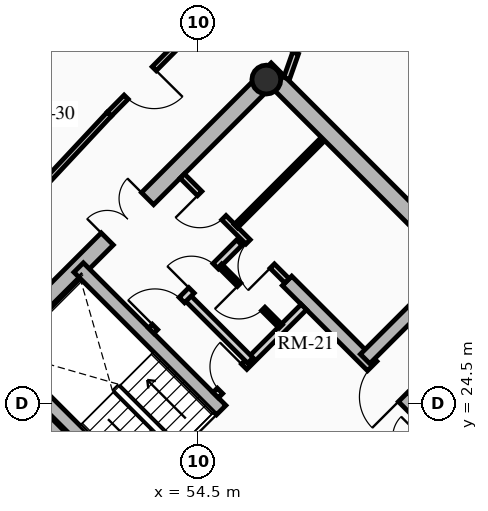
"""IFC4 building model, lengths in metres.
Left out: names, types, materials, properties, quantities, classifications, styles, units other than length and angle.
Written with IfcOpenShell. Run it as: python <this file> out.ifc"""

import sys

from ifc_helpers import new_model, si_unit, direction, frame, frame_2d, origin, origin_2d, place, context, subcontext, project, spatial, rectangle, hollow_circle, extrude, source, transform, mapped, element, fill, save


model = new_model("IFC4")
c1 = context("Model", 3, precision=1e-05, world=origin(), true_north=direction((0.0, 1.0)))
c2 = subcontext(c1, "Body", "Model", "MODEL_VIEW")
j1 = project(units=[si_unit("LENGTHUNIT", "METRE"), si_unit("PLANEANGLEUNIT", "RADIAN")], contexts=[c1])
p1 = place(None, origin())
s1 = spatial("IfcSite", under=j1, at=p1, CompositionType="ELEMENT")
p2 = place(p1, origin())
s2 = spatial("IfcBuilding", under=s1, at=p2, CompositionType="ELEMENT")
p3 = place(p2, frame((0.0, 0.0, 144.04)))
s3 = spatial("IfcBuildingStorey", under=s2, at=p3, CompositionType="ELEMENT", Elevation=144.04)
for number, where, z_axis, x_axis in (
    (1, (58.737, 15.697, 0.0), (0.0, 0.0, 1.0), (-0.707, 0.707, 0.0)),
    (2, (66.303, 23.263, 0.0), (0.0, 0.0, 1.0), (-0.707, 0.707, 0.0)),
):
    element("IfcWall", number, at=place(p3, frame(where, z_axis=z_axis, x_axis=x_axis)), inside=s3, PredefinedType="SHEAR", context=c2, shape_type="SweptSolid", body=[
        extrude(rectangle(XDim=14.2, YDim=0.45, at=frame_2d((7.1, 0.0))), origin(), (0.0, 0.0, 1.0), 3.06),
    ])
p4 = place(p3, frame((48.856, 25.578, 0.0), z_axis=(0.0, 0.0, 1.0), x_axis=(0.707106781187, 0.707106781187, 0.0)))
e3 = element("IfcWall", 3, at=p4, inside=s3, PredefinedType="SHEAR", context=c2, shape_type="SweptSolid", body=[
    extrude(rectangle(XDim=10.7, YDim=0.45, at=frame_2d((5.35, 0.0))), origin(), (0.0, 0.0, 1.0), 3.06),
])
m1 = source(origin(), c2, "Body", "SweptSolid", [
    extrude(rectangle(XDim=1.5, YDim=2.02, at=frame_2d((0.75, 1.01))), frame((0.0, 0.235, 0.0), z_axis=(0.0, -1.0, 0.0), x_axis=(1.0, 0.0, 0.0)), (0.0, 0.0, 1.0), 0.47),
])
p5 = place(p4, frame((4.6, 0.0, 0.0)))
e4 = element("IfcOpeningElement", 4, at=p5, cuts=e3, PredefinedType="OPENING", context=c2, shape_type="MappedRepresentation", body=[
    mapped(m1, transform((0.0, 0.0, 0.0), x_axis=(1.0, 0.0, 0.0), y_axis=(0.0, 1.0, 0.0), z_axis=(0.0, 0.0, 1.0), scale=1.0)),
])
p6 = place(p3, frame((61.078, 18.355, 0.0), z_axis=(0.0, 0.0, 1.0), x_axis=(-0.707106781187, 0.707106781187, 0.0)))
e5 = element("IfcWall", 5, at=p6, inside=s3, PredefinedType="SHEAR", context=c2, shape_type="SweptSolid", body=[
    extrude(rectangle(XDim=13.75, YDim=0.35, at=frame_2d((6.875, 0.0))), origin(), (0.0, 0.0, 1.0), 3.06),
])
m2 = source(origin(), c2, "Body", "SweptSolid", [
    extrude(rectangle(XDim=1.1, YDim=2.015, at=frame_2d((0.55, 1.007))), frame((0.0, 0.185, 0.0), z_axis=(0.0, -1.0, 0.0), x_axis=(1.0, 0.0, 0.0)), (0.0, 0.0, 1.0), 0.37),
])
p7 = place(p6, frame((4.875, 0.0, 0.0)))
e6 = element("IfcOpeningElement", 6, at=p7, cuts=e5, PredefinedType="OPENING", context=c2, shape_type="MappedRepresentation", body=[
    mapped(m2, transform((0.0, 0.0, 0.0), x_axis=(1.0, 0.0, 0.0), y_axis=(0.0, 1.0, 0.0), z_axis=(0.0, 0.0, 1.0), scale=1.0)),
])
p8 = place(p6, frame((0.65, 0.0, 0.0)))
e7 = element("IfcOpeningElement", 7, at=p8, cuts=e5, PredefinedType="OPENING", context=c2, shape_type="MappedRepresentation", body=[
    mapped(m2, transform((0.0, 0.0, 0.0), x_axis=(1.0, 0.0, 0.0), y_axis=(0.0, 1.0, 0.0), z_axis=(0.0, 0.0, 1.0), scale=1.0)),
])
p9 = place(p6, frame((2.65, 0.0, 0.0)))
e8 = element("IfcOpeningElement", 8, at=p9, cuts=e5, PredefinedType="OPENING", context=c2, shape_type="MappedRepresentation", body=[
    mapped(m2, transform((0.0, 0.0, 0.0), x_axis=(1.0, 0.0, 0.0), y_axis=(0.0, 1.0, 0.0), z_axis=(0.0, 0.0, 1.0), scale=1.0)),
])
m3 = source(origin(), c2, "Body", "SweptSolid", [
    extrude(rectangle(XDim=1.15, YDim=2.02, at=frame_2d((0.575, 1.01))), frame((0.0, 0.185, 0.0), z_axis=(0.0, -1.0, 0.0), x_axis=(1.0, 0.0, 0.0)), (0.0, 0.0, 1.0), 0.37),
])
p10 = place(p6, frame((7.295, 0.0, 0.0)))
e9 = element("IfcOpeningElement", 9, at=p10, cuts=e5, PredefinedType="OPENING", context=c2, shape_type="MappedRepresentation", body=[
    mapped(m3, transform((0.0, 0.0, 0.0), x_axis=(1.0, 0.0, 0.0), y_axis=(0.0, 1.0, 0.0), z_axis=(0.0, 0.0, 1.0), scale=1.0)),
])
p11 = place(p3, frame((63.645, 20.922, 0.0), z_axis=(0.0, 0.0, 1.0), x_axis=(-0.70711946392, 0.707094098226, 0.0)))
e10 = element("IfcWall", 10, at=p11, inside=s3, PredefinedType="SHEAR", context=c2, shape_type="SweptSolid", body=[
    extrude(rectangle(XDim=9.625, YDim=0.35, at=frame_2d((4.812, 0.0))), origin(), (0.0, 0.0, 1.0), 3.06),
])
p12 = place(p11, frame((5.305, 0.0, 0.0)))
e11 = element("IfcOpeningElement", 11, at=p12, cuts=e10, PredefinedType="OPENING", context=c2, shape_type="MappedRepresentation", body=[
    mapped(m3, transform((0.0, 0.0, 0.0), x_axis=(1.0, 0.0, 0.0), y_axis=(0.0, 1.0, 0.0), z_axis=(0.0, 0.0, 1.0), scale=1.0)),
])
p13 = place(p3, frame((53.922, 21.141, 0.0), z_axis=(0.0, 0.0, 1.0), x_axis=(-0.707088616009, 0.707124945897, 0.0)))
e12 = element("IfcWall", 12, at=p13, inside=s3, PredefinedType="SHEAR", context=c2, shape_type="SweptSolid", body=[
    extrude(rectangle(XDim=6.72, YDim=0.35, at=frame_2d((3.36, 0.0))), origin(), (0.0, 0.0, 1.0), 3.06),
])
p14 = place(p3, frame((58.893, 25.674, 0.0), z_axis=(0.0, 0.0, 1.0), x_axis=(0.707106781187, 0.707106781187, 0.0)))
e13 = element("IfcWall", 13, at=p14, inside=s3, PredefinedType="SHEAR", context=c2, shape_type="SweptSolid", body=[
    extrude(rectangle(XDim=3.285, YDim=0.35, at=frame_2d((1.643, 0.0))), origin(), (0.0, 0.0, 1.0), 3.06),
])
p15 = place(p3, frame((56.294, 33.024, 0.0), z_axis=(0.0, 0.0, 1.0), x_axis=(0.707106781187, 0.707106781187, 0.0)))
e14 = element("IfcColumn", 14, at=p15, inside=s3, PredefinedType="COLUMN", context=c2, shape_type="SweptSolid", body=[
    extrude(hollow_circle(Radius=0.38, WallThickness=0.032, at=origin_2d()), origin(), (0.0, 0.0, 1.0), 3.06),
])
p16 = place(p3, frame((58.214, 21.467, 0.0), z_axis=(0.0, 0.0, 1.0), x_axis=(0.707106781187, 0.707106781187, 0.0)))
e15 = element("IfcWall", 15, at=p16, inside=s3, PredefinedType="PARTITIONING", context=c2, shape_type="SweptSolid", body=[
    extrude(rectangle(XDim=3.28, YDim=0.2, at=frame_2d((1.64, 0.0))), origin(), (0.0, 0.0, 1.0), 2.705),
])
m4 = source(origin(), c2, "Body", "SweptSolid", [
    extrude(rectangle(XDim=1.5, YDim=2.02, at=frame_2d((0.75, 1.01))), frame((0.0, 0.11, 0.0), z_axis=(0.0, -1.0, 0.0), x_axis=(1.0, 0.0, 0.0)), (0.0, 0.0, 1.0), 0.22),
])
p17 = place(p16, frame((1.55, 0.0, 0.0)))
e16 = element("IfcOpeningElement", 16, at=p17, cuts=e15, PredefinedType="OPENING", context=c2, shape_type="MappedRepresentation", body=[
    mapped(m4, transform((0.0, 0.0, 0.0), x_axis=(1.0, 0.0, 0.0), y_axis=(0.0, 1.0, 0.0), z_axis=(0.0, 0.0, 1.0), scale=1.0)),
])
p18 = place(p3, frame((54.961, 24.719, 0.0), z_axis=(0.0, 0.0, 1.0), x_axis=(0.707106781187, 0.707106781187, 0.0)))
e17 = element("IfcWall", 17, at=p18, inside=s3, PredefinedType="PARTITIONING", context=c2, shape_type="SweptSolid", body=[
    extrude(rectangle(XDim=3.28, YDim=0.2, at=frame_2d((1.64, 0.0))), origin(), (0.0, 0.0, 1.0), 2.705),
])
m5 = source(origin(), c2, "Body", "SweptSolid", [
    extrude(rectangle(XDim=0.9, YDim=2.005, at=frame_2d((0.45, 1.002))), frame((0.0, 0.11, 0.0), z_axis=(0.0, -1.0, 0.0), x_axis=(1.0, 0.0, 0.0)), (0.0, 0.0, 1.0), 0.22),
])
p19 = place(p18, frame((0.16, 0.0, 0.0)))
e18 = element("IfcOpeningElement", 18, at=p19, cuts=e17, PredefinedType="OPENING", context=c2, shape_type="MappedRepresentation", body=[
    mapped(m5, transform((0.0, 0.0, 0.0), x_axis=(1.0, 0.0, 0.0), y_axis=(0.0, 1.0, 0.0), z_axis=(0.0, 0.0, 1.0), scale=1.0)),
])
p20 = place(p3, frame((55.874, 25.631, 0.0), z_axis=(0.0, 0.0, 1.0), x_axis=(-0.707157639372, 0.707055919343, 0.0)))
e19 = element("IfcWall", 19, at=p20, inside=s3, PredefinedType="PARTITIONING", context=c2, shape_type="SweptSolid", body=[
    extrude(rectangle(XDim=2.4, YDim=0.2, at=frame_2d((1.2, 0.0))), origin(), (0.0, 0.0, 1.0), 2.705),
])
p21 = place(p3, frame((53.264, 26.416, 0.0), z_axis=(0.0, 0.0, 1.0), x_axis=(0.707106781187, 0.707106781187, 0.0)))
e20 = element("IfcWall", 20, at=p21, inside=s3, PredefinedType="PARTITIONING", context=c2, shape_type="SweptSolid", body=[
    extrude(rectangle(XDim=3.28, YDim=0.2, at=frame_2d((1.64, 0.0))), origin(), (0.0, 0.0, 1.0), 2.705),
])
m6 = source(origin(), c2, "Body", "SweptSolid", [
    extrude(rectangle(XDim=1.0, YDim=2.015, at=frame_2d((0.5, 1.007))), frame((0.0, 0.11, 0.0), z_axis=(0.0, -1.0, 0.0), x_axis=(1.0, 0.0, 0.0)), (0.0, 0.0, 1.0), 0.22),
])
p22 = place(p21, frame((0.14, 0.0, 0.0)))
e21 = element("IfcOpeningElement", 21, at=p22, cuts=e20, PredefinedType="OPENING", context=c2, shape_type="MappedRepresentation", body=[
    mapped(m6, transform((0.0, 0.0, 0.0), x_axis=(1.0, 0.0, 0.0), y_axis=(0.0, 1.0, 0.0), z_axis=(0.0, 0.0, 1.0), scale=1.0)),
])
p23 = place(p21, frame((1.5, 0.0, 0.0)))
e22 = element("IfcOpeningElement", 22, at=p23, cuts=e20, PredefinedType="OPENING", context=c2, shape_type="MappedRepresentation", body=[
    mapped(m5, transform((0.0, 0.0, 0.0), x_axis=(1.0, 0.0, 0.0), y_axis=(0.0, 1.0, 0.0), z_axis=(0.0, 0.0, 1.0), scale=1.0)),
])
p24 = place(p3, frame((56.673, 26.529, 0.0), z_axis=(0.0, 0.0, 1.0), x_axis=(-0.707052764397, 0.70716079385, 0.0)))
e23 = element("IfcWall", 23, at=p24, inside=s3, PredefinedType="PARTITIONING", context=c2, shape_type="SweptSolid", body=[
    extrude(rectangle(XDim=2.26, YDim=0.125, at=frame_2d((1.13, 0.0))), origin(), (0.0, 0.0, 1.0), 2.705),
])
m7 = source(origin(), c2, "Body", "SweptSolid", [
    extrude(rectangle(XDim=0.9, YDim=2.005, at=frame_2d((0.45, 1.002))), frame((0.0, 0.073, 0.0), z_axis=(0.0, -1.0, 0.0), x_axis=(1.0, 0.0, 0.0)), (0.0, 0.0, 1.0), 0.145),
])
p25 = place(p24, frame((0.65, 0.0, 0.0)))
e24 = element("IfcOpeningElement", 24, at=p25, cuts=e23, PredefinedType="OPENING", context=c2, shape_type="MappedRepresentation", body=[
    mapped(m7, transform((0.0, 0.0, 0.0), x_axis=(1.0, 0.0, 0.0), y_axis=(0.0, 1.0, 0.0), z_axis=(0.0, 0.0, 1.0), scale=1.0)),
])
p26 = place(p3, frame((56.839, 27.728, 0.0), z_axis=(0.0, 0.0, 1.0), x_axis=(-0.707106781187, 0.707106781187, 0.0)))
e25 = element("IfcWall", 25, at=p26, inside=s3, PredefinedType="PARTITIONING", context=c2, shape_type="SweptSolid", body=[
    extrude(rectangle(XDim=3.9, YDim=0.16, at=frame_2d((1.95, 0.0))), origin(), (0.0, 0.0, 1.0), 2.705),
])
m8 = source(origin(), c2, "Body", "SweptSolid", [
    extrude(rectangle(XDim=0.9, YDim=2.005, at=frame_2d((0.45, 1.002))), frame((0.0, 0.09, 0.0), z_axis=(0.0, -1.0, 0.0), x_axis=(1.0, 0.0, 0.0)), (0.0, 0.0, 1.0), 0.18),
])
p27 = place(p26, frame((0.55, 0.0, 0.0)))
e26 = element("IfcOpeningElement", 26, at=p27, cuts=e25, PredefinedType="OPENING", context=c2, shape_type="MappedRepresentation", body=[
    mapped(m8, transform((0.0, 0.0, 0.0), x_axis=(1.0, 0.0, 0.0), y_axis=(0.0, 1.0, 0.0), z_axis=(0.0, 0.0, 1.0), scale=1.0)),
])
p28 = place(p26, frame((2.35, 0.0, 0.0)))
e27 = element("IfcOpeningElement", 27, at=p28, cuts=e25, PredefinedType="OPENING", context=c2, shape_type="MappedRepresentation", body=[
    mapped(m8, transform((0.0, 0.0, 0.0), x_axis=(1.0, 0.0, 0.0), y_axis=(0.0, 1.0, 0.0), z_axis=(0.0, 0.0, 1.0), scale=1.0)),
])
p29 = place(p3, frame((55.492, 29.167, 0.0), z_axis=(0.0, 0.0, 1.0), x_axis=(0.707144688645, 0.707068871696, 0.0)))
e28 = element("IfcWall", 28, at=p29, inside=s3, PredefinedType="PARTITIONING", context=c2, shape_type="SweptSolid", body=[
    extrude(rectangle(XDim=3.22, YDim=0.125, at=frame_2d((1.61, 0.0))), origin(), (0.0, 0.0, 1.0), 2.242),
])
p30 = place(p3, frame((54.501, 34.479, 0.0), z_axis=(0.0, 0.0, 1.0), x_axis=(-0.70346073929, -0.710734119258, 0.0)))
e29 = element("IfcWall", 29, at=p30, inside=s3, PredefinedType="PARTITIONING", context=c2, shape_type="SweptSolid", body=[
    extrude(rectangle(XDim=3.323, YDim=0.15, at=frame_2d((1.662, 0.0))), origin(), (0.0, 0.0, 1.0), 2.275),
])
m9 = source(origin(), c2, "Body", "SweptSolid", [
    extrude(rectangle(XDim=1.05, YDim=2.015, at=frame_2d((0.525, 1.007))), frame((0.0, 0.085, 0.0), z_axis=(0.0, -1.0, 0.0), x_axis=(1.0, 0.0, 0.0)), (0.0, 0.0, 1.0), 0.17),
])
p31 = place(p30, frame((1.645, 0.0, 0.0)))
e30 = element("IfcOpeningElement", 30, at=p31, cuts=e29, PredefinedType="OPENING", context=c2, shape_type="MappedRepresentation", body=[
    mapped(m9, transform((0.0, 0.0, 0.0), x_axis=(1.0, 0.0, 0.0), y_axis=(0.0, 1.0, 0.0), z_axis=(0.0, 0.0, 1.0), scale=1.0)),
])
p32 = place(p3, frame((52.163, 32.117, 0.0), z_axis=(0.0, 0.0, 1.0), x_axis=(-0.682485296115, -0.730899323154, 0.0)))
e31 = element("IfcWall", 31, at=p32, inside=s3, PredefinedType="PARTITIONING", context=c2, shape_type="SweptSolid", body=[
    extrude(rectangle(XDim=6.404, YDim=0.15, at=frame_2d((3.202, 0.0))), origin(), (0.0, 0.0, 1.0), 2.275),
])
p33 = place(p3, frame((56.828, 33.056, 0.0), z_axis=(0.0, 0.0, 1.0), x_axis=(0.334295395752, 0.942468348741, 0.0)))
e32 = element("IfcWall", 32, at=p33, inside=s3, PredefinedType="PARTITIONING", context=c2, shape_type="SweptSolid", body=[
    extrude(rectangle(XDim=1.956, YDim=0.16, at=frame_2d((0.978, 0.0))), origin(), (0.0, 0.0, 1.0), 2.275),
])
m10 = source(origin(), c2, "Body", "SweptSolid", [
    extrude(rectangle(XDim=1.05, YDim=2.015, at=frame_2d((0.525, 1.007))), frame((0.0, 0.09, 0.0), z_axis=(0.0, -1.0, 0.0), x_axis=(1.0, 0.0, 0.0)), (0.0, 0.0, 1.0), 0.18),
])
p34 = place(p33, frame((0.706, 0.0, 0.0)))
e33 = element("IfcOpeningElement", 33, at=p34, cuts=e32, PredefinedType="OPENING", context=c2, shape_type="MappedRepresentation", body=[
    mapped(m10, transform((0.0, 0.0, 0.0), x_axis=(1.0, 0.0, 0.0), y_axis=(0.0, 1.0, 0.0), z_axis=(0.0, 0.0, 1.0), scale=1.0)),
])
p35 = place(p3, frame((52.885, 35.914, 0.0), z_axis=(0.0, 0.0, 1.0), x_axis=(-0.750358205808, -0.66103143872, 0.0)))
e34 = element("IfcWall", 34, at=p35, inside=s3, PredefinedType="PARTITIONING", context=c2, shape_type="SweptSolid", body=[
    extrude(rectangle(XDim=3.654, YDim=0.125, at=frame_2d((1.827, 0.0))), origin(), (0.0, 0.0, 1.0), 2.275),
])
m11 = source(origin(), c2, "Body", "SweptSolid", [
    extrude(rectangle(XDim=1.15, YDim=2.02, at=frame_2d((0.575, 1.01))), frame((0.0, 0.025, 0.0), z_axis=(0.0, -1.0, 0.0), x_axis=(1.0, 0.0, 0.0)), (0.0, 0.0, 1.0), 0.05),
])
p36 = place(p10, origin())
e35 = element("IfcDoor", 35, at=p36, inside=s3, OperationType="SINGLE_SWING_RIGHT", PredefinedType="DOOR", context=c2, shape_type="MappedRepresentation", body=[
    mapped(m11, transform((0.0, 0.0, 0.0), x_axis=(1.0, 0.0, 0.0), y_axis=(0.0, 1.0, 0.0), z_axis=(0.0, 0.0, 1.0), scale=1.0)),
])
fill(e9, e35)
p37 = place(p12, origin())
e36 = element("IfcDoor", 36, at=p37, inside=s3, OperationType="SINGLE_SWING_LEFT", PredefinedType="DOOR", context=c2, shape_type="MappedRepresentation", body=[
    mapped(m11, transform((0.0, 0.0, 0.0), x_axis=(1.0, 0.0, 0.0), y_axis=(0.0, 1.0, 0.0), z_axis=(0.0, 0.0, 1.0), scale=1.0)),
])
fill(e11, e36)
m12 = source(origin(), c2, "Body", "SweptSolid", [
    extrude(rectangle(XDim=1.5, YDim=2.02, at=frame_2d((0.75, 1.01))), frame((0.0, 0.025, 0.0), z_axis=(0.0, -1.0, 0.0), x_axis=(1.0, 0.0, 0.0)), (0.0, 0.0, 1.0), 0.05),
])
p38 = place(p5, origin())
e37 = element("IfcDoor", 37, at=p38, inside=s3, OperationType="DOUBLE_DOOR_SINGLE_SWING", PredefinedType="DOOR", context=c2, shape_type="MappedRepresentation", body=[
    mapped(m12, transform((0.0, 0.0, 0.0), x_axis=(1.0, 0.0, 0.0), y_axis=(0.0, 1.0, 0.0), z_axis=(0.0, 0.0, 1.0), scale=1.0)),
])
fill(e4, e37)
m13 = source(origin(), c2, "Body", "SweptSolid", [
    extrude(rectangle(XDim=0.9, YDim=2.005, at=frame_2d((0.45, 1.002))), frame((0.0, 0.025, 0.0), z_axis=(0.0, -1.0, 0.0), x_axis=(1.0, 0.0, 0.0)), (0.0, 0.0, 1.0), 0.05),
])
p39 = place(p19, origin())
e38 = element("IfcDoor", 38, at=p39, inside=s3, OperationType="SINGLE_SWING_RIGHT", PredefinedType="DOOR", context=c2, shape_type="MappedRepresentation", body=[
    mapped(m13, transform((0.0, 0.0, 0.0), x_axis=(1.0, 0.0, 0.0), y_axis=(0.0, 1.0, 0.0), z_axis=(0.0, 0.0, 1.0), scale=1.0)),
])
fill(e18, e38)
m14 = source(origin(), c2, "Body", "SweptSolid", [
    extrude(rectangle(XDim=1.0, YDim=2.015, at=frame_2d((0.5, 1.007))), frame((0.0, 0.025, 0.0), z_axis=(0.0, -1.0, 0.0), x_axis=(1.0, 0.0, 0.0)), (0.0, 0.0, 1.0), 0.05),
])
p40 = place(p22, origin())
e39 = element("IfcDoor", 39, at=p40, inside=s3, OperationType="SINGLE_SWING_LEFT", PredefinedType="DOOR", context=c2, shape_type="MappedRepresentation", body=[
    mapped(m14, transform((0.0, 0.0, 0.0), x_axis=(1.0, 0.0, 0.0), y_axis=(0.0, 1.0, 0.0), z_axis=(0.0, 0.0, 1.0), scale=1.0)),
])
fill(e21, e39)
p41 = place(p23, origin())
e40 = element("IfcDoor", 40, at=p41, inside=s3, OperationType="SINGLE_SWING_LEFT", PredefinedType="DOOR", context=c2, shape_type="MappedRepresentation", body=[
    mapped(m13, transform((0.0, 0.0, 0.0), x_axis=(1.0, 0.0, 0.0), y_axis=(0.0, 1.0, 0.0), z_axis=(0.0, 0.0, 1.0), scale=1.0)),
])
fill(e22, e40)
p42 = place(p25, origin())
e41 = element("IfcDoor", 41, at=p42, inside=s3, OperationType="SINGLE_SWING_RIGHT", PredefinedType="DOOR", context=c2, shape_type="MappedRepresentation", body=[
    mapped(m13, transform((0.0, 0.0, 0.0), x_axis=(1.0, 0.0, 0.0), y_axis=(0.0, 1.0, 0.0), z_axis=(0.0, 0.0, 1.0), scale=1.0)),
])
fill(e24, e41)
p43 = place(p27, origin())
e42 = element("IfcDoor", 42, at=p43, inside=s3, OperationType="SINGLE_SWING_LEFT", PredefinedType="DOOR", context=c2, shape_type="MappedRepresentation", body=[
    mapped(m13, transform((0.0, 0.0, 0.0), x_axis=(1.0, 0.0, 0.0), y_axis=(0.0, 1.0, 0.0), z_axis=(0.0, 0.0, 1.0), scale=1.0)),
])
fill(e26, e42)
p44 = place(p28, origin())
e43 = element("IfcDoor", 43, at=p44, inside=s3, OperationType="SINGLE_SWING_RIGHT", PredefinedType="DOOR", context=c2, shape_type="MappedRepresentation", body=[
    mapped(m13, transform((0.0, 0.0, 0.0), x_axis=(1.0, 0.0, 0.0), y_axis=(0.0, 1.0, 0.0), z_axis=(0.0, 0.0, 1.0), scale=1.0)),
])
fill(e27, e43)
m15 = source(origin(), c2, "Body", "SweptSolid", [
    extrude(rectangle(XDim=1.05, YDim=2.015, at=frame_2d((0.525, 1.007))), frame((0.0, 0.025, 0.0), z_axis=(0.0, -1.0, 0.0), x_axis=(1.0, 0.0, 0.0)), (0.0, 0.0, 1.0), 0.05),
])
p45 = place(p34, origin())
e44 = element("IfcDoor", 44, at=p45, inside=s3, OperationType="SINGLE_SWING_LEFT", PredefinedType="DOOR", context=c2, shape_type="MappedRepresentation", body=[
    mapped(m15, transform((0.0, 0.0, 0.0), x_axis=(1.0, 0.0, 0.0), y_axis=(0.0, 1.0, 0.0), z_axis=(0.0, 0.0, 1.0), scale=1.0)),
])
fill(e33, e44)
p46 = place(p31, origin())
e45 = element("IfcDoor", 45, at=p46, inside=s3, OperationType="SINGLE_SWING_LEFT", PredefinedType="DOOR", context=c2, shape_type="MappedRepresentation", body=[
    mapped(m15, transform((0.0, 0.0, 0.0), x_axis=(1.0, 0.0, 0.0), y_axis=(0.0, 1.0, 0.0), z_axis=(0.0, 0.0, 1.0), scale=1.0)),
])
fill(e30, e45)
save(model, sys.argv[1])
